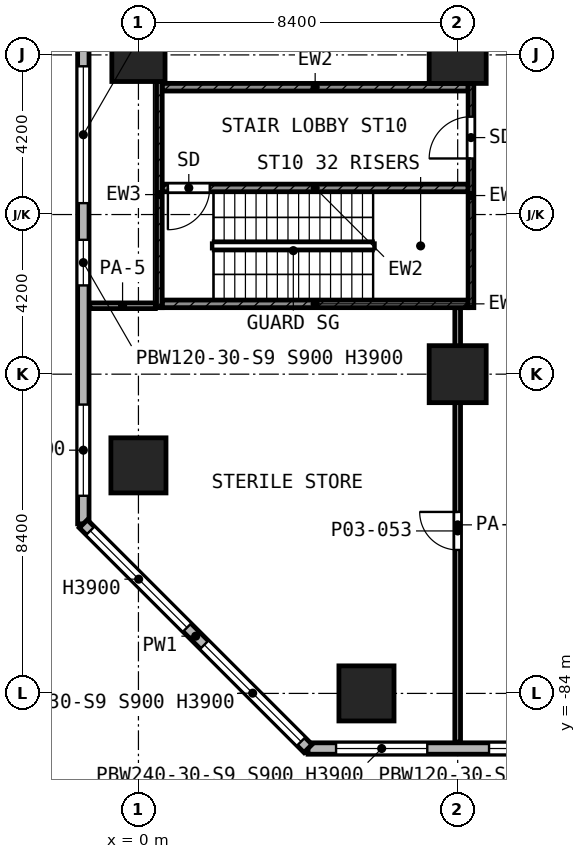
"""IFC4 building model, lengths in metres.
Left out: names, types, materials, properties, quantities, classifications, styles, units other than length and angle.
Written with IfcOpenShell. Run it as: python <this file> out.ifc"""

import sys

from ifc_helpers import new_model, si_unit, direction, frame, frame_2d, origin, origin_2d, place, context, subcontext, project, spatial, rectangle, extrude, element, fill, save


model = new_model("IFC4")
c1 = context("Model", 3, precision=1e-05, world=origin(), true_north=direction((0.0, 1.0)))
c2 = subcontext(c1, "Body", "Model", "MODEL_VIEW")
j1 = project(units=[si_unit("LENGTHUNIT", "METRE"), si_unit("PLANEANGLEUNIT", "RADIAN")], contexts=[c1])
p1 = place(None, origin())
s1 = spatial("IfcSite", under=j1, at=p1, CompositionType="ELEMENT")
p2 = place(p1, origin())
s2 = spatial("IfcBuilding", under=s1, at=p2, CompositionType="ELEMENT")
p3 = place(p2, frame((0.0, 0.0, 12.6)))
s3 = spatial("IfcBuildingStorey", under=s2, at=p3, CompositionType="ELEMENT", Elevation=12.6)
p4 = place(p3, frame((0.0, -67.2, 0.0), z_axis=(0.0, 0.0, 1.0), x_axis=(1.0, 0.0, 0.0)))
e1 = element("IfcColumn", 1, at=p4, inside=s3, PredefinedType="COLUMN", context=c2, shape_type="SweptSolid", body=[
    extrude(rectangle(XDim=1.4, YDim=1.4, at=origin_2d()), origin(), (0.0, 0.0, 1.0), 5.6),
])
for number, where, z_axis, x_axis in (
    (2, (8.4, -67.2, 0.0), (0.0, 0.0, 1.0), (1.0, 0.0, 0.0)),
    (3, (8.4, -75.6, 0.0), (0.0, 0.0, 1.0), (1.0, 0.0, 0.0)),
):
    element("IfcColumn", number, at=place(p3, frame(where, z_axis=z_axis, x_axis=x_axis)), inside=s3, PredefinedType="COLUMN", context=c2, shape_type="SweptSolid", body=[
        extrude(rectangle(XDim=1.5, YDim=1.5, at=origin_2d()), origin(), (0.0, 0.0, 1.0), 5.6),
    ])
for number, where, z_axis, x_axis in (
    (4, (0.0, -78.0, 0.0), (0.0, 0.0, 1.0), (1.0, 0.0, 0.0)),
    (5, (6.0, -84.0, 0.0), (0.0, 0.0, 1.0), (1.0, 0.0, 0.0)),
):
    element("IfcColumn", number, at=place(p3, frame(where, z_axis=z_axis, x_axis=x_axis)), inside=s3, PredefinedType="COLUMN", context=c2, shape_type="SweptSolid", body=[
        extrude(rectangle(XDim=1.45, YDim=1.45, at=origin_2d()), origin(), (0.0, 0.0, 1.0), 5.6),
    ])
p5 = place(p3, frame((-1.45, -4.462, 0.0), z_axis=(0.0, 0.0, 1.0), x_axis=(0.0, -1.0, 0.0)))
e6 = element("IfcWall", 6, at=p5, inside=s3, PredefinedType="SOLIDWALL", context=c2, shape_type="SweptSolid", body=[
    extrude(rectangle(XDim=75.076, YDim=0.3, at=frame_2d((37.538, 0.0))), origin(), (0.0, 0.0, 1.0), 5.25),
])
p6 = place(p5, frame((0.738, 0.0, 0.9)))
e7 = element("IfcOpeningElement", 7, at=p6, cuts=e6, PredefinedType="OPENING", context=c2, shape_type="SweptSolid", body=[
    extrude(rectangle(XDim=2.4, YDim=3.0, at=frame_2d((1.2, 1.5))), frame((0.0, 0.16, 0.0), z_axis=(0.0, -1.0, 0.0), x_axis=(1.0, 0.0, 0.0)), (0.0, 0.0, 1.0), 0.32),
])
p7 = place(p5, frame((4.238, 0.0, 0.9)))
e8 = element("IfcOpeningElement", 8, at=p7, cuts=e6, PredefinedType="OPENING", context=c2, shape_type="SweptSolid", body=[
    extrude(rectangle(XDim=3.6, YDim=3.0, at=frame_2d((1.8, 1.5))), frame((0.0, 0.16, 0.0), z_axis=(0.0, -1.0, 0.0), x_axis=(1.0, 0.0, 0.0)), (0.0, 0.0, 1.0), 0.32),
])
p8 = place(p5, frame((8.438, 0.0, 0.9)))
e9 = element("IfcOpeningElement", 9, at=p8, cuts=e6, PredefinedType="OPENING", context=c2, shape_type="SweptSolid", body=[
    extrude(rectangle(XDim=3.6, YDim=3.0, at=frame_2d((1.8, 1.5))), frame((0.0, 0.16, 0.0), z_axis=(0.0, -1.0, 0.0), x_axis=(1.0, 0.0, 0.0)), (0.0, 0.0, 1.0), 0.32),
])
p9 = place(p5, frame((12.638, 0.0, 0.9)))
e10 = element("IfcOpeningElement", 10, at=p9, cuts=e6, PredefinedType="OPENING", context=c2, shape_type="SweptSolid", body=[
    extrude(rectangle(XDim=3.6, YDim=3.0, at=frame_2d((1.8, 1.5))), frame((0.0, 0.16, 0.0), z_axis=(0.0, -1.0, 0.0), x_axis=(1.0, 0.0, 0.0)), (0.0, 0.0, 1.0), 0.32),
])
p10 = place(p5, frame((16.838, 0.0, 0.9)))
e11 = element("IfcOpeningElement", 11, at=p10, cuts=e6, PredefinedType="OPENING", context=c2, shape_type="SweptSolid", body=[
    extrude(rectangle(XDim=3.6, YDim=3.0, at=frame_2d((1.8, 1.5))), frame((0.0, 0.16, 0.0), z_axis=(0.0, -1.0, 0.0), x_axis=(1.0, 0.0, 0.0)), (0.0, 0.0, 1.0), 0.32),
])
p11 = place(p5, frame((21.403, 0.0, 0.9)))
e12 = element("IfcOpeningElement", 12, at=p11, cuts=e6, PredefinedType="OPENING", context=c2, shape_type="SweptSolid", body=[
    extrude(rectangle(XDim=2.4, YDim=3.0, at=frame_2d((1.2, 1.5))), frame((0.0, 0.16, 0.0), z_axis=(0.0, -1.0, 0.0), x_axis=(1.0, 0.0, 0.0)), (0.0, 0.0, 1.0), 0.32),
])
p12 = place(p5, frame((25.238, 0.0, 0.9)))
e13 = element("IfcOpeningElement", 13, at=p12, cuts=e6, PredefinedType="OPENING", context=c2, shape_type="SweptSolid", body=[
    extrude(rectangle(XDim=3.6, YDim=3.0, at=frame_2d((1.8, 1.5))), frame((0.0, 0.16, 0.0), z_axis=(0.0, -1.0, 0.0), x_axis=(1.0, 0.0, 0.0)), (0.0, 0.0, 1.0), 0.32),
])
p13 = place(p5, frame((30.423, 0.0, 0.9)))
e14 = element("IfcOpeningElement", 14, at=p13, cuts=e6, PredefinedType="OPENING", context=c2, shape_type="SweptSolid", body=[
    extrude(rectangle(XDim=2.4, YDim=3.0, at=frame_2d((1.2, 1.5))), frame((0.0, 0.16, 0.0), z_axis=(0.0, -1.0, 0.0), x_axis=(1.0, 0.0, 0.0)), (0.0, 0.0, 1.0), 0.32),
])
p14 = place(p5, frame((33.638, 0.0, 0.9)))
e15 = element("IfcOpeningElement", 15, at=p14, cuts=e6, PredefinedType="OPENING", context=c2, shape_type="SweptSolid", body=[
    extrude(rectangle(XDim=3.6, YDim=3.0, at=frame_2d((1.8, 1.5))), frame((0.0, 0.16, 0.0), z_axis=(0.0, -1.0, 0.0), x_axis=(1.0, 0.0, 0.0)), (0.0, 0.0, 1.0), 0.32),
])
p15 = place(p5, frame((37.838, 0.0, 0.9)))
e16 = element("IfcOpeningElement", 16, at=p15, cuts=e6, PredefinedType="OPENING", context=c2, shape_type="SweptSolid", body=[
    extrude(rectangle(XDim=3.6, YDim=3.0, at=frame_2d((1.8, 1.5))), frame((0.0, 0.16, 0.0), z_axis=(0.0, -1.0, 0.0), x_axis=(1.0, 0.0, 0.0)), (0.0, 0.0, 1.0), 0.32),
])
p16 = place(p5, frame((42.038, 0.0, 0.9)))
e17 = element("IfcOpeningElement", 17, at=p16, cuts=e6, PredefinedType="OPENING", context=c2, shape_type="SweptSolid", body=[
    extrude(rectangle(XDim=3.6, YDim=3.0, at=frame_2d((1.8, 1.5))), frame((0.0, 0.16, 0.0), z_axis=(0.0, -1.0, 0.0), x_axis=(1.0, 0.0, 0.0)), (0.0, 0.0, 1.0), 0.32),
])
p17 = place(p5, frame((46.238, 0.0, 0.9)))
e18 = element("IfcOpeningElement", 18, at=p17, cuts=e6, PredefinedType="OPENING", context=c2, shape_type="SweptSolid", body=[
    extrude(rectangle(XDim=3.6, YDim=3.0, at=frame_2d((1.8, 1.5))), frame((0.0, 0.16, 0.0), z_axis=(0.0, -1.0, 0.0), x_axis=(1.0, 0.0, 0.0)), (0.0, 0.0, 1.0), 0.32),
])
p18 = place(p5, frame((50.438, 0.0, 0.9)))
e19 = element("IfcOpeningElement", 19, at=p18, cuts=e6, PredefinedType="OPENING", context=c2, shape_type="SweptSolid", body=[
    extrude(rectangle(XDim=3.6, YDim=3.0, at=frame_2d((1.8, 1.5))), frame((0.0, 0.16, 0.0), z_axis=(0.0, -1.0, 0.0), x_axis=(1.0, 0.0, 0.0)), (0.0, 0.0, 1.0), 0.32),
])
p19 = place(p5, frame((54.638, 0.0, 0.9)))
e20 = element("IfcOpeningElement", 20, at=p19, cuts=e6, PredefinedType="OPENING", context=c2, shape_type="SweptSolid", body=[
    extrude(rectangle(XDim=3.6, YDim=3.0, at=frame_2d((1.8, 1.5))), frame((0.0, 0.16, 0.0), z_axis=(0.0, -1.0, 0.0), x_axis=(1.0, 0.0, 0.0)), (0.0, 0.0, 1.0), 0.32),
])
p20 = place(p5, frame((58.838, 0.0, 0.9)))
e21 = element("IfcOpeningElement", 21, at=p20, cuts=e6, PredefinedType="OPENING", context=c2, shape_type="SweptSolid", body=[
    extrude(rectangle(XDim=3.6, YDim=3.0, at=frame_2d((1.8, 1.5))), frame((0.0, 0.16, 0.0), z_axis=(0.0, -1.0, 0.0), x_axis=(1.0, 0.0, 0.0)), (0.0, 0.0, 1.0), 0.32),
])
p21 = place(p5, frame((63.038, 0.0, 0.9)))
e22 = element("IfcOpeningElement", 22, at=p21, cuts=e6, PredefinedType="OPENING", context=c2, shape_type="SweptSolid", body=[
    extrude(rectangle(XDim=3.6, YDim=3.0, at=frame_2d((1.8, 1.5))), frame((0.0, 0.16, 0.0), z_axis=(0.0, -1.0, 0.0), x_axis=(1.0, 0.0, 0.0)), (0.0, 0.0, 1.0), 0.32),
])
p22 = place(p5, frame((67.603, 0.0, 0.9)))
e23 = element("IfcOpeningElement", 23, at=p22, cuts=e6, PredefinedType="OPENING", context=c2, shape_type="SweptSolid", body=[
    extrude(rectangle(XDim=1.2, YDim=3.0, at=frame_2d((0.6, 1.5))), frame((0.0, 0.16, 0.0), z_axis=(0.0, -1.0, 0.0), x_axis=(1.0, 0.0, 0.0)), (0.0, 0.0, 1.0), 0.32),
])
p23 = place(p5, frame((71.938, 0.0, 0.9)))
e24 = element("IfcOpeningElement", 24, at=p23, cuts=e6, PredefinedType="OPENING", context=c2, shape_type="SweptSolid", body=[
    extrude(rectangle(XDim=2.4, YDim=3.0, at=frame_2d((1.2, 1.5))), frame((0.0, 0.16, 0.0), z_axis=(0.0, -1.0, 0.0), x_axis=(1.0, 0.0, 0.0)), (0.0, 0.0, 1.0), 0.32),
])
p24 = place(p3, frame((-1.45, -79.538, 0.0), z_axis=(0.0, 0.0, 1.0), x_axis=(0.707106781187, -0.707106781187, 0.0)))
e25 = element("IfcWall", 25, at=p24, inside=s3, PredefinedType="SOLIDWALL", context=c2, shape_type="SweptSolid", body=[
    extrude(rectangle(XDim=8.361, YDim=0.3, at=frame_2d((4.181, 0.0))), origin(), (0.0, 0.0, 1.0), 5.25),
])
p25 = place(p24, frame((0.259, 0.0, 0.9)))
e26 = element("IfcOpeningElement", 26, at=p25, cuts=e25, PredefinedType="OPENING", context=c2, shape_type="SweptSolid", body=[
    extrude(rectangle(XDim=3.6, YDim=3.0, at=frame_2d((1.8, 1.5))), frame((0.0, 0.16, 0.0), z_axis=(0.0, -1.0, 0.0), x_axis=(1.0, 0.0, 0.0)), (0.0, 0.0, 1.0), 0.32),
])
p26 = place(p24, frame((4.502, 0.0, 0.9)))
e27 = element("IfcOpeningElement", 27, at=p26, cuts=e25, PredefinedType="OPENING", context=c2, shape_type="SweptSolid", body=[
    extrude(rectangle(XDim=3.6, YDim=3.0, at=frame_2d((1.8, 1.5))), frame((0.0, 0.16, 0.0), z_axis=(0.0, -1.0, 0.0), x_axis=(1.0, 0.0, 0.0)), (0.0, 0.0, 1.0), 0.32),
])
p27 = place(p3, frame((4.462, -85.45, 0.0), z_axis=(0.0, 0.0, 1.0), x_axis=(1.0, 0.0, 0.0)))
e28 = element("IfcWall", 28, at=p27, inside=s3, PredefinedType="SOLIDWALL", context=c2, shape_type="SweptSolid", body=[
    extrude(rectangle(XDim=24.676, YDim=0.3, at=frame_2d((12.338, 0.0))), origin(), (0.0, 0.0, 1.0), 5.25),
])
p28 = place(p27, frame((0.738, 0.0, 0.9)))
e29 = element("IfcOpeningElement", 29, at=p28, cuts=e28, PredefinedType="OPENING", context=c2, shape_type="SweptSolid", body=[
    extrude(rectangle(XDim=2.4, YDim=3.0, at=frame_2d((1.2, 1.5))), frame((0.0, 0.16, 0.0), z_axis=(0.0, -1.0, 0.0), x_axis=(1.0, 0.0, 0.0)), (0.0, 0.0, 1.0), 0.32),
])
p29 = place(p27, frame((4.763, 0.0, 0.9)))
e30 = element("IfcOpeningElement", 30, at=p29, cuts=e28, PredefinedType="OPENING", context=c2, shape_type="SweptSolid", body=[
    extrude(rectangle(XDim=1.2, YDim=3.0, at=frame_2d((0.6, 1.5))), frame((0.0, 0.16, 0.0), z_axis=(0.0, -1.0, 0.0), x_axis=(1.0, 0.0, 0.0)), (0.0, 0.0, 1.0), 0.32),
])
p30 = place(p27, frame((8.438, 0.0, 0.9)))
e31 = element("IfcOpeningElement", 31, at=p30, cuts=e28, PredefinedType="OPENING", context=c2, shape_type="SweptSolid", body=[
    extrude(rectangle(XDim=3.6, YDim=3.0, at=frame_2d((1.8, 1.5))), frame((0.0, 0.16, 0.0), z_axis=(0.0, -1.0, 0.0), x_axis=(1.0, 0.0, 0.0)), (0.0, 0.0, 1.0), 0.32),
])
p31 = place(p27, frame((12.638, 0.0, 0.9)))
e32 = element("IfcOpeningElement", 32, at=p31, cuts=e28, PredefinedType="OPENING", context=c2, shape_type="SweptSolid", body=[
    extrude(rectangle(XDim=3.6, YDim=3.0, at=frame_2d((1.8, 1.5))), frame((0.0, 0.16, 0.0), z_axis=(0.0, -1.0, 0.0), x_axis=(1.0, 0.0, 0.0)), (0.0, 0.0, 1.0), 0.32),
])
p32 = place(p27, frame((16.838, 0.0, 0.9)))
e33 = element("IfcOpeningElement", 33, at=p32, cuts=e28, PredefinedType="OPENING", context=c2, shape_type="SweptSolid", body=[
    extrude(rectangle(XDim=3.6, YDim=3.0, at=frame_2d((1.8, 1.5))), frame((0.0, 0.16, 0.0), z_axis=(0.0, -1.0, 0.0), x_axis=(1.0, 0.0, 0.0)), (0.0, 0.0, 1.0), 0.32),
])
p33 = place(p27, frame((21.538, 0.0, 0.9)))
e34 = element("IfcOpeningElement", 34, at=p33, cuts=e28, PredefinedType="OPENING", context=c2, shape_type="SweptSolid", body=[
    extrude(rectangle(XDim=2.4, YDim=3.0, at=frame_2d((1.2, 1.5))), frame((0.0, 0.16, 0.0), z_axis=(0.0, -1.0, 0.0), x_axis=(1.0, 0.0, 0.0)), (0.0, 0.0, 1.0), 0.32),
])
p34 = place(p3, frame((0.55, -73.85, 0.0), z_axis=(0.0, 0.0, 1.0), x_axis=(0.0, 1.0, 0.0)))
e35 = element("IfcWall", 35, at=p34, inside=s3, PredefinedType="SHEAR", context=c2, shape_type="SweptSolid", body=[
    extrude(rectangle(XDim=5.95, YDim=0.15, at=frame_2d((2.975, 0.0))), origin(), (0.0, 0.0, 1.0), 5.25),
])
p35 = place(p3, frame((8.75, -73.85, 0.0), z_axis=(0.0, 0.0, 1.0), x_axis=(0.0, 1.0, 0.0)))
e36 = element("IfcWall", 36, at=p35, inside=s3, PredefinedType="SHEAR", context=c2, shape_type="SweptSolid", body=[
    extrude(rectangle(XDim=5.9, YDim=0.15, at=frame_2d((2.95, 0.0))), origin(), (0.0, 0.0, 1.0), 5.25),
])
p36 = place(p35, frame((3.925, 0.0, 0.0)))
e37 = element("IfcOpeningElement", 37, at=p36, cuts=e36, PredefinedType="OPENING", context=c2, shape_type="SweptSolid", body=[
    extrude(rectangle(XDim=1.1, YDim=2.1, at=frame_2d((0.55, 1.05))), frame((0.0, 0.085, 0.0), z_axis=(0.0, -1.0, 0.0), x_axis=(1.0, 0.0, 0.0)), (0.0, 0.0, 1.0), 0.17),
])
p37 = place(p3, frame((0.625, -73.75, 0.0), z_axis=(0.0, 0.0, 1.0), x_axis=(1.0, 0.0, 0.0)))
e38 = element("IfcWall", 38, at=p37, inside=s3, PredefinedType="SHEAR", context=c2, shape_type="SweptSolid", body=[
    extrude(rectangle(XDim=8.05, YDim=0.2, at=frame_2d((4.025, 0.0))), origin(), (0.0, 0.0, 1.0), 5.25),
])
p38 = place(p3, frame((0.625, -70.7, 0.0), z_axis=(0.0, 0.0, 1.0), x_axis=(1.0, 0.0, 0.0)))
e39 = element("IfcWall", 39, at=p38, inside=s3, PredefinedType="SHEAR", context=c2, shape_type="SweptSolid", body=[
    extrude(rectangle(XDim=8.05, YDim=0.2, at=frame_2d((4.025, 0.0))), origin(), (0.0, 0.0, 1.0), 5.25),
])
p39 = place(p38, frame((0.15, 0.0, 0.0)))
e40 = element("IfcOpeningElement", 40, at=p39, cuts=e39, PredefinedType="OPENING", context=c2, shape_type="SweptSolid", body=[
    extrude(rectangle(XDim=1.1, YDim=2.1, at=frame_2d((0.55, 1.05))), frame((0.0, 0.11, 0.0), z_axis=(0.0, -1.0, 0.0), x_axis=(1.0, 0.0, 0.0)), (0.0, 0.0, 1.0), 0.22),
])
p40 = place(p3, frame((0.625, -68.05, 0.0), z_axis=(0.0, 0.0, 1.0), x_axis=(1.0, 0.0, 0.0)))
e41 = element("IfcWall", 41, at=p40, inside=s3, PredefinedType="SHEAR", context=c2, shape_type="SweptSolid", body=[
    extrude(rectangle(XDim=8.05, YDim=0.2, at=frame_2d((4.025, 0.0))), origin(), (0.0, 0.0, 1.0), 5.25),
])
p41 = place(p3, frame((-1.28, -73.8, 0.0), z_axis=(0.0, 0.0, 1.0), x_axis=(1.0, 0.0, 0.0)))
e42 = element("IfcWall", 42, at=p41, inside=s3, PredefinedType="PARTITIONING", context=c2, shape_type="SweptSolid", body=[
    extrude(rectangle(XDim=1.725, YDim=0.15, at=frame_2d((0.863, 0.0))), origin(), (0.0, 0.0, 1.0), 3.85),
])
p42 = place(p3, frame((8.4, -85.28, 0.0), z_axis=(0.0, 0.0, 1.0), x_axis=(0.0, 1.0, 0.0)))
e43 = element("IfcWall", 43, at=p42, inside=s3, PredefinedType="PARTITIONING", context=c2, shape_type="SweptSolid", body=[
    extrude(rectangle(XDim=11.43, YDim=0.15, at=frame_2d((5.715, 0.0))), origin(), (0.0, 0.0, 1.0), 3.85),
])
p43 = place(p42, frame((5.055, 0.0, 0.0)))
e44 = element("IfcOpeningElement", 44, at=p43, cuts=e43, PredefinedType="OPENING", context=c2, shape_type="SweptSolid", body=[
    extrude(rectangle(XDim=1.0, YDim=2.1, at=frame_2d((0.5, 1.05))), frame((0.0, 0.085, 0.0), z_axis=(0.0, -1.0, 0.0), x_axis=(1.0, 0.0, 0.0)), (0.0, 0.0, 1.0), 0.17),
])
p44 = place(p3, frame((8.4, -67.947, 0.0), z_axis=(0.0, 0.0, 1.0), x_axis=(0.0, 1.0, 0.0)))
e45 = element("IfcWall", 45, at=p44, inside=s3, PredefinedType="PARTITIONING", context=c2, shape_type="SweptSolid", body=[
    extrude(rectangle(XDim=25.597, YDim=0.15, at=frame_2d((12.798, 0.0))), origin(), (0.0, 0.0, 1.0), 5.25),
])
p45 = place(p44, frame((18.809, 0.0, 0.0)))
e46 = element("IfcOpeningElement", 46, at=p45, cuts=e45, PredefinedType="OPENING", context=c2, shape_type="SweptSolid", body=[
    extrude(rectangle(XDim=1.5, YDim=2.1, at=frame_2d((0.75, 1.05))), frame((0.0, 0.085, 0.0), z_axis=(0.0, -1.0, 0.0), x_axis=(1.0, 0.0, 0.0)), (0.0, 0.0, 1.0), 0.17),
])
p46 = place(p44, frame((20.822, 0.0, 0.0)))
e47 = element("IfcOpeningElement", 47, at=p46, cuts=e45, PredefinedType="OPENING", context=c2, shape_type="SweptSolid", body=[
    extrude(rectangle(XDim=1.5, YDim=2.1, at=frame_2d((0.75, 1.05))), frame((0.0, 0.085, 0.0), z_axis=(0.0, -1.0, 0.0), x_axis=(1.0, 0.0, 0.0)), (0.0, 0.0, 1.0), 0.17),
])
p47 = place(p44, frame((22.835, 0.0, 0.0)))
e48 = element("IfcOpeningElement", 48, at=p47, cuts=e45, PredefinedType="OPENING", context=c2, shape_type="SweptSolid", body=[
    extrude(rectangle(XDim=1.5, YDim=2.1, at=frame_2d((0.75, 1.05))), frame((0.0, 0.085, 0.0), z_axis=(0.0, -1.0, 0.0), x_axis=(1.0, 0.0, 0.0)), (0.0, 0.0, 1.0), 0.17),
])
p48 = place(p44, frame((10.497, 0.0, 0.0)))
e49 = element("IfcOpeningElement", 49, at=p48, cuts=e45, PredefinedType="OPENING", context=c2, shape_type="SweptSolid", body=[
    extrude(rectangle(XDim=1.5, YDim=2.1, at=frame_2d((0.75, 1.05))), frame((0.0, 0.085, 0.0), z_axis=(0.0, -1.0, 0.0), x_axis=(1.0, 0.0, 0.0)), (0.0, 0.0, 1.0), 0.17),
])
p49 = place(p44, frame((12.597, 0.0, 0.0)))
e50 = element("IfcOpeningElement", 50, at=p49, cuts=e45, PredefinedType="OPENING", context=c2, shape_type="SweptSolid", body=[
    extrude(rectangle(XDim=1.5, YDim=2.1, at=frame_2d((0.75, 1.05))), frame((0.0, 0.085, 0.0), z_axis=(0.0, -1.0, 0.0), x_axis=(1.0, 0.0, 0.0)), (0.0, 0.0, 1.0), 0.17),
])
p50 = place(p44, frame((14.697, 0.0, 0.0)))
e51 = element("IfcOpeningElement", 51, at=p50, cuts=e45, PredefinedType="OPENING", context=c2, shape_type="SweptSolid", body=[
    extrude(rectangle(XDim=1.5, YDim=2.1, at=frame_2d((0.75, 1.05))), frame((0.0, 0.085, 0.0), z_axis=(0.0, -1.0, 0.0), x_axis=(1.0, 0.0, 0.0)), (0.0, 0.0, 1.0), 0.17),
])
p51 = place(p44, frame((1.537, 0.0, 0.0)))
e52 = element("IfcOpeningElement", 52, at=p51, cuts=e45, PredefinedType="OPENING", context=c2, shape_type="SweptSolid", body=[
    extrude(rectangle(XDim=1.5, YDim=2.1, at=frame_2d((0.75, 1.05))), frame((0.0, 0.085, 0.0), z_axis=(0.0, -1.0, 0.0), x_axis=(1.0, 0.0, 0.0)), (0.0, 0.0, 1.0), 0.17),
])
p52 = place(p44, frame((3.823, 0.0, 0.0)))
e53 = element("IfcOpeningElement", 53, at=p52, cuts=e45, PredefinedType="OPENING", context=c2, shape_type="SweptSolid", body=[
    extrude(rectangle(XDim=1.5, YDim=2.1, at=frame_2d((0.75, 1.05))), frame((0.0, 0.085, 0.0), z_axis=(0.0, -1.0, 0.0), x_axis=(1.0, 0.0, 0.0)), (0.0, 0.0, 1.0), 0.17),
])
p53 = place(p44, frame((6.11, 0.0, 0.0)))
e54 = element("IfcOpeningElement", 54, at=p53, cuts=e45, PredefinedType="OPENING", context=c2, shape_type="SweptSolid", body=[
    extrude(rectangle(XDim=1.5, YDim=2.1, at=frame_2d((0.75, 1.05))), frame((0.0, 0.085, 0.0), z_axis=(0.0, -1.0, 0.0), x_axis=(1.0, 0.0, 0.0)), (0.0, 0.0, 1.0), 0.17),
])
p54 = place(p21, origin())
e55 = element("IfcWindow", 55, at=p54, inside=s3, PartitioningType="SINGLE_PANEL", PredefinedType="WINDOW", context=c2, shape_type="SweptSolid", body=[
    extrude(rectangle(XDim=3.6, YDim=3.0, at=frame_2d((1.8, 1.5))), frame((0.0, 0.03, 0.0), z_axis=(0.0, -1.0, 0.0), x_axis=(1.0, 0.0, 0.0)), (0.0, 0.0, 1.0), 0.06),
])
fill(e22, e55)
p55 = place(p22, origin())
e56 = element("IfcWindow", 56, at=p55, inside=s3, PartitioningType="SINGLE_PANEL", PredefinedType="WINDOW", context=c2, shape_type="SweptSolid", body=[
    extrude(rectangle(XDim=1.2, YDim=3.0, at=frame_2d((0.6, 1.5))), frame((0.0, 0.03, 0.0), z_axis=(0.0, -1.0, 0.0), x_axis=(1.0, 0.0, 0.0)), (0.0, 0.0, 1.0), 0.06),
])
fill(e23, e56)
p56 = place(p23, origin())
e57 = element("IfcWindow", 57, at=p56, inside=s3, PartitioningType="SINGLE_PANEL", PredefinedType="WINDOW", context=c2, shape_type="SweptSolid", body=[
    extrude(rectangle(XDim=2.4, YDim=3.0, at=frame_2d((1.2, 1.5))), frame((0.0, 0.03, 0.0), z_axis=(0.0, -1.0, 0.0), x_axis=(1.0, 0.0, 0.0)), (0.0, 0.0, 1.0), 0.06),
])
fill(e24, e57)
p57 = place(p25, origin())
e58 = element("IfcWindow", 58, at=p57, inside=s3, PartitioningType="SINGLE_PANEL", PredefinedType="WINDOW", context=c2, shape_type="SweptSolid", body=[
    extrude(rectangle(XDim=3.6, YDim=3.0, at=frame_2d((1.8, 1.5))), frame((0.0, 0.03, 0.0), z_axis=(0.0, -1.0, 0.0), x_axis=(1.0, 0.0, 0.0)), (0.0, 0.0, 1.0), 0.06),
])
fill(e26, e58)
p58 = place(p26, origin())
e59 = element("IfcWindow", 59, at=p58, inside=s3, PartitioningType="SINGLE_PANEL", PredefinedType="WINDOW", context=c2, shape_type="SweptSolid", body=[
    extrude(rectangle(XDim=3.6, YDim=3.0, at=frame_2d((1.8, 1.5))), frame((0.0, 0.03, 0.0), z_axis=(0.0, -1.0, 0.0), x_axis=(1.0, 0.0, 0.0)), (0.0, 0.0, 1.0), 0.06),
])
fill(e27, e59)
p59 = place(p28, origin())
e60 = element("IfcWindow", 60, at=p59, inside=s3, PartitioningType="SINGLE_PANEL", PredefinedType="WINDOW", context=c2, shape_type="SweptSolid", body=[
    extrude(rectangle(XDim=2.4, YDim=3.0, at=frame_2d((1.2, 1.5))), frame((0.0, 0.03, 0.0), z_axis=(0.0, -1.0, 0.0), x_axis=(1.0, 0.0, 0.0)), (0.0, 0.0, 1.0), 0.06),
])
fill(e29, e60)
p60 = place(p29, origin())
e61 = element("IfcWindow", 61, at=p60, inside=s3, PartitioningType="SINGLE_PANEL", PredefinedType="WINDOW", context=c2, shape_type="SweptSolid", body=[
    extrude(rectangle(XDim=1.2, YDim=3.0, at=frame_2d((0.6, 1.5))), frame((0.0, 0.03, 0.0), z_axis=(0.0, -1.0, 0.0), x_axis=(1.0, 0.0, 0.0)), (0.0, 0.0, 1.0), 0.06),
])
fill(e30, e61)
p61 = place(p39, frame((1.1, 0.0, 0.0), z_axis=(0.0, 0.0, 1.0), x_axis=(-1.0, 0.0, 0.0)))
e62 = element("IfcDoor", 62, at=p61, inside=s3, OperationType="SINGLE_SWING_LEFT", PredefinedType="DOOR", context=c2, shape_type="SweptSolid", body=[
    extrude(rectangle(XDim=1.1, YDim=2.1, at=frame_2d((0.55, 1.05))), frame((0.0, 0.025, 0.0), z_axis=(0.0, -1.0, 0.0), x_axis=(1.0, 0.0, 0.0)), (0.0, 0.0, 1.0), 0.05),
])
fill(e40, e62)
p62 = place(p36, origin())
e63 = element("IfcDoor", 63, at=p62, inside=s3, OperationType="SINGLE_SWING_LEFT", PredefinedType="DOOR", context=c2, shape_type="SweptSolid", body=[
    extrude(rectangle(XDim=1.1, YDim=2.1, at=frame_2d((0.55, 1.05))), frame((0.0, 0.025, 0.0), z_axis=(0.0, -1.0, 0.0), x_axis=(1.0, 0.0, 0.0)), (0.0, 0.0, 1.0), 0.05),
])
fill(e37, e63)
p63 = place(p43, origin())
e64 = element("IfcDoor", 64, at=p63, inside=s3, OperationType="SINGLE_SWING_RIGHT", PredefinedType="DOOR", context=c2, shape_type="SweptSolid", body=[
    extrude(rectangle(XDim=1.0, YDim=2.1, at=frame_2d((0.5, 1.05))), frame((0.0, 0.025, 0.0), z_axis=(0.0, -1.0, 0.0), x_axis=(1.0, 0.0, 0.0)), (0.0, 0.0, 1.0), 0.05),
])
fill(e44, e64)
save(model, sys.argv[1])
